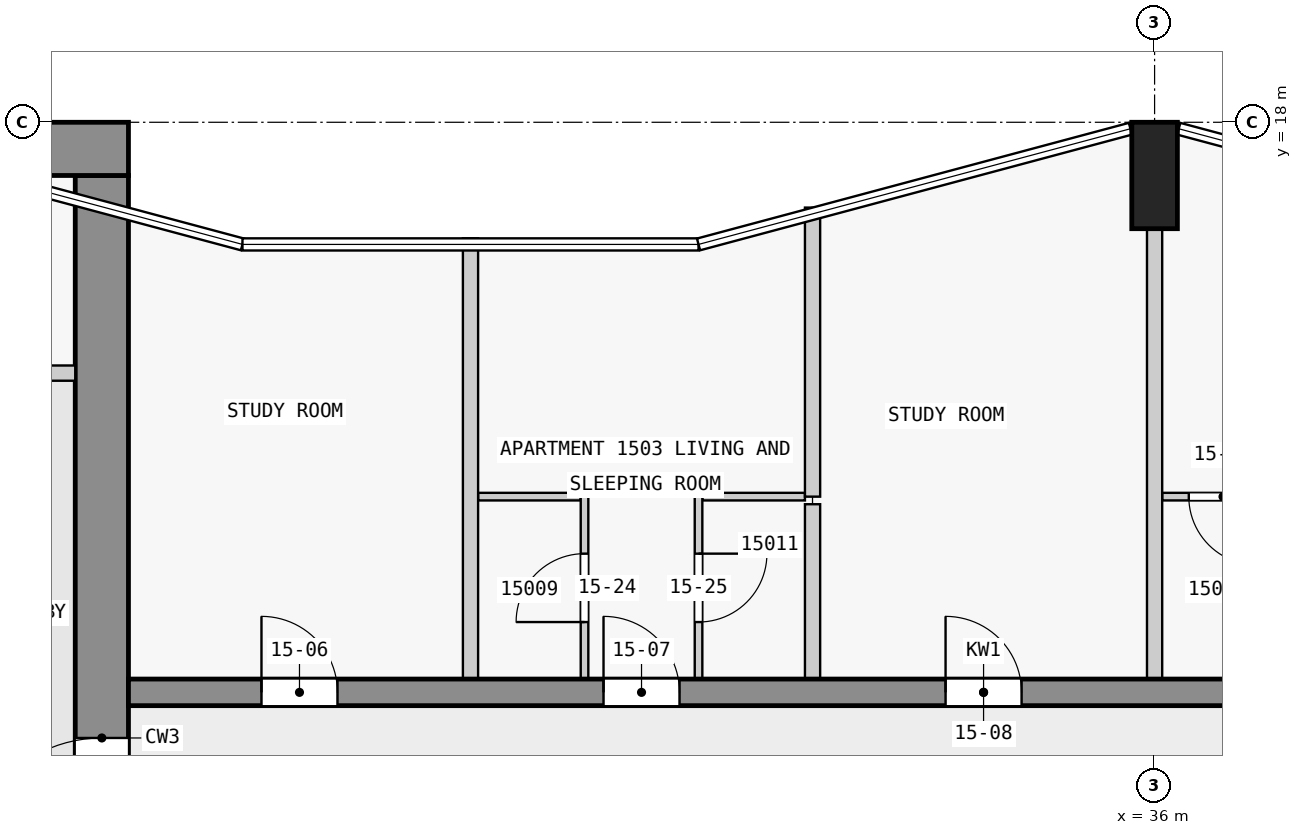
"""IFC4 building model, lengths in metres.
Left out: names, types, materials, properties, quantities, classifications, styles, units other than length and angle.
Written with IfcOpenShell. Run it as: python <this file> out.ifc"""

import sys

from ifc_helpers import new_model, si_unit, direction, frame, frame_2d, origin, origin_2d, place, context, subcontext, project, spatial, rectangle, extrude, element, fill, save


model = new_model("IFC4")
c1 = context("Model", 3, precision=1e-05, world=origin(), true_north=direction((0.0, 1.0)))
c2 = subcontext(c1, "Body", "Model", "MODEL_VIEW")
j1 = project(units=[si_unit("LENGTHUNIT", "METRE"), si_unit("PLANEANGLEUNIT", "RADIAN")], contexts=[c1])
p1 = place(None, origin())
s1 = spatial("IfcSite", under=j1, at=p1, CompositionType="ELEMENT")
p2 = place(p1, origin())
s2 = spatial("IfcBuilding", under=s1, at=p2, CompositionType="ELEMENT")
p3 = place(p2, frame((0.0, 0.0, 61.8)))
s3 = spatial("IfcBuildingStorey", under=s2, at=p3, CompositionType="ELEMENT", Elevation=61.8)
p4 = place(p3, frame((36.0, 17.3, 0.0), z_axis=(0.0, 0.0, 1.0), x_axis=(1.0, 0.0, 0.0)))
e1 = element("IfcColumn", 1, at=p4, inside=s3, PredefinedType="COLUMN", context=c2, shape_type="SweptSolid", body=[
    extrude(rectangle(XDim=0.6, YDim=1.4, at=origin_2d()), origin(), (0.0, 0.0, 1.0), 3.5),
])
p5 = place(p3, frame((1.6, 17.65, 0.0), z_axis=(0.0, 0.0, 1.0), x_axis=(1.0, 0.0, 0.0)))
e2 = element("IfcWall", 2, at=p5, inside=s3, PredefinedType="SHEAR", context=c2, shape_type="SweptSolid", body=[
    extrude(rectangle(XDim=20.9, YDim=0.7, at=frame_2d((10.45, 0.0))), origin(), (0.0, 0.0, 1.0), 3.25),
])
p6 = place(p5, frame((6.5, 0.0, 0.0)))
e3 = element("IfcOpeningElement", 3, at=p6, cuts=e2, PredefinedType="OPENING", context=c2, shape_type="SweptSolid", body=[
    extrude(rectangle(XDim=1.8, YDim=2.1, at=frame_2d((0.9, 1.05))), frame((0.0, 0.36, 0.0), z_axis=(0.0, -1.0, 0.0), x_axis=(1.0, 0.0, 0.0)), (0.0, 0.0, 1.0), 0.72),
])
p7 = place(p3, frame((22.15, 2.5, 0.0), z_axis=(0.0, 0.0, 1.0), x_axis=(0.0, 1.0, 0.0)))
e4 = element("IfcWall", 4, at=p7, inside=s3, PredefinedType="SHEAR", context=c2, shape_type="SweptSolid", body=[
    extrude(rectangle(XDim=14.8, YDim=0.7, at=frame_2d((7.4, 0.0))), origin(), (0.0, 0.0, 1.0), 3.25),
])
p8 = place(p7, frame((5.6, 0.0, 0.0)))
e5 = element("IfcOpeningElement", 5, at=p8, cuts=e4, PredefinedType="OPENING", context=c2, shape_type="SweptSolid", body=[
    extrude(rectangle(XDim=1.8, YDim=2.1, at=frame_2d((0.9, 1.05))), frame((0.0, 0.36, 0.0), z_axis=(0.0, -1.0, 0.0), x_axis=(1.0, 0.0, 0.0)), (0.0, 0.0, 1.0), 0.72),
])
p9 = place(p3, frame((22.5, 10.5, 0.0), z_axis=(0.0, 0.0, 1.0), x_axis=(1.0, 0.0, 0.0)))
e6 = element("IfcWall", 6, at=p9, inside=s3, PredefinedType="SHEAR", context=c2, shape_type="SweptSolid", body=[
    extrude(rectangle(XDim=22.5, YDim=0.35, at=frame_2d((11.25, 0.0))), origin(), (0.0, 0.0, 1.0), 3.25),
])
p10 = place(p9, frame((1.75, 0.0, 0.0)))
e7 = element("IfcOpeningElement", 7, at=p10, cuts=e6, PredefinedType="OPENING", context=c2, shape_type="SweptSolid", body=[
    extrude(rectangle(XDim=1.0, YDim=2.1, at=frame_2d((0.5, 1.05))), frame((0.0, 0.185, 0.0), z_axis=(0.0, -1.0, 0.0), x_axis=(1.0, 0.0, 0.0)), (0.0, 0.0, 1.0), 0.37),
])
p11 = place(p9, frame((6.25, 0.0, 0.0)))
e8 = element("IfcOpeningElement", 8, at=p11, cuts=e6, PredefinedType="OPENING", context=c2, shape_type="SweptSolid", body=[
    extrude(rectangle(XDim=1.0, YDim=2.1, at=frame_2d((0.5, 1.05))), frame((0.0, 0.185, 0.0), z_axis=(0.0, -1.0, 0.0), x_axis=(1.0, 0.0, 0.0)), (0.0, 0.0, 1.0), 0.37),
])
p12 = place(p9, frame((10.75, 0.0, 0.0)))
e9 = element("IfcOpeningElement", 9, at=p12, cuts=e6, PredefinedType="OPENING", context=c2, shape_type="SweptSolid", body=[
    extrude(rectangle(XDim=1.0, YDim=2.1, at=frame_2d((0.5, 1.05))), frame((0.0, 0.185, 0.0), z_axis=(0.0, -1.0, 0.0), x_axis=(1.0, 0.0, 0.0)), (0.0, 0.0, 1.0), 0.37),
])
p13 = place(p9, frame((16.85, 0.0, 0.0)))
e10 = element("IfcOpeningElement", 10, at=p13, cuts=e6, PredefinedType="OPENING", context=c2, shape_type="SweptSolid", body=[
    extrude(rectangle(XDim=1.0, YDim=2.1, at=frame_2d((0.5, 1.05))), frame((0.0, 0.185, 0.0), z_axis=(0.0, -1.0, 0.0), x_axis=(1.0, 0.0, 0.0)), (0.0, 0.0, 1.0), 0.37),
])
p14 = place(p3, frame((18.6, 14.7, 0.0), z_axis=(0.0, 0.0, 1.0), x_axis=(1.0, 0.0, 0.0)))
e11 = element("IfcWall", 11, at=p14, inside=s3, PredefinedType="PARTITIONING", context=c2, shape_type="SweptSolid", body=[
    extrude(rectangle(XDim=3.2, YDim=0.2, at=frame_2d((1.6, 0.0))), origin(), (0.0, 0.0, 1.0), 3.25),
])
p15 = place(p14, frame((0.15, 0.0, 0.0)))
e12 = element("IfcOpeningElement", 12, at=p15, cuts=e11, PredefinedType="OPENING", context=c2, shape_type="SweptSolid", body=[
    extrude(rectangle(XDim=0.9, YDim=2.1, at=frame_2d((0.45, 1.05))), frame((0.0, 0.11, 0.0), z_axis=(0.0, -1.0, 0.0), x_axis=(1.0, 0.0, 0.0)), (0.0, 0.0, 1.0), 0.22),
])
p16 = place(p14, frame((1.75, 0.0, 0.0)))
e13 = element("IfcOpeningElement", 13, at=p16, cuts=e11, PredefinedType="OPENING", context=c2, shape_type="SweptSolid", body=[
    extrude(rectangle(XDim=0.9, YDim=2.1, at=frame_2d((0.45, 1.05))), frame((0.0, 0.11, 0.0), z_axis=(0.0, -1.0, 0.0), x_axis=(1.0, 0.0, 0.0)), (0.0, 0.0, 1.0), 0.22),
])
for number, where, z_axis, x_axis in (
    (14, (28.45, 13.075, 0.0), (0.0, 0.0, 1.0), (-1.0, 0.0, 0.0)),
    (15, (31.4, 13.075, 0.0), (0.0, 0.0, 1.0), (-1.0, 0.0, 0.0)),
):
    element("IfcWall", number, at=place(p3, frame(where, z_axis=z_axis, x_axis=x_axis)), inside=s3, PredefinedType="PARTITIONING", context=c2, shape_type="SweptSolid", body=[
        extrude(rectangle(XDim=1.35, YDim=0.1, at=frame_2d((0.675, 0.0))), origin(), (0.0, 0.0, 1.0), 3.25),
    ])
p17 = place(p3, frame((39.1, 13.075, 0.0), z_axis=(0.0, 0.0, 1.0), x_axis=(-1.0, 0.0, 0.0)))
e16 = element("IfcWall", 16, at=p17, inside=s3, PredefinedType="PARTITIONING", context=c2, shape_type="SweptSolid", body=[
    extrude(rectangle(XDim=3.0, YDim=0.1, at=frame_2d((1.5, 0.0))), origin(), (0.0, 0.0, 1.0), 3.25),
])
p18 = place(p17, frame((1.75, 0.0, 0.0)))
e17 = element("IfcOpeningElement", 17, at=p18, cuts=e16, PredefinedType="OPENING", context=c2, shape_type="SweptSolid", body=[
    extrude(rectangle(XDim=0.9, YDim=2.1, at=frame_2d((0.45, 1.05))), frame((0.0, 0.06, 0.0), z_axis=(0.0, -1.0, 0.0), x_axis=(1.0, 0.0, 0.0)), (0.0, 0.0, 1.0), 0.12),
])
p19 = place(p3, frame((27.0, 10.675, 0.0), z_axis=(0.0, 0.0, 1.0), x_axis=(0.0, 1.0, 0.0)))
e18 = element("IfcWall", 18, at=p19, inside=s3, PredefinedType="PARTITIONING", context=c2, shape_type="SweptSolid", body=[
    extrude(rectangle(XDim=5.798, YDim=0.2, at=frame_2d((2.899, 0.0))), origin(), (0.0, 0.0, 1.0), 3.25),
])
p20 = place(p3, frame((28.5, 10.675, 0.0), z_axis=(0.0, 0.0, 1.0), x_axis=(0.0, 1.0, 0.0)))
e19 = element("IfcWall", 19, at=p20, inside=s3, PredefinedType="PARTITIONING", context=c2, shape_type="SweptSolid", body=[
    extrude(rectangle(XDim=2.4, YDim=0.1, at=frame_2d((1.2, 0.0))), origin(), (0.0, 0.0, 1.0), 3.25),
])
p21 = place(p20, frame((0.75, 0.0, 0.0)))
e20 = element("IfcOpeningElement", 20, at=p21, cuts=e19, PredefinedType="OPENING", context=c2, shape_type="SweptSolid", body=[
    extrude(rectangle(XDim=0.9, YDim=2.1, at=frame_2d((0.45, 1.05))), frame((0.0, 0.06, 0.0), z_axis=(0.0, -1.0, 0.0), x_axis=(1.0, 0.0, 0.0)), (0.0, 0.0, 1.0), 0.12),
])
p22 = place(p3, frame((30.0, 13.075, 0.0), z_axis=(0.0, 0.0, 1.0), x_axis=(0.0, -1.0, 0.0)))
e21 = element("IfcWall", 21, at=p22, inside=s3, PredefinedType="PARTITIONING", context=c2, shape_type="SweptSolid", body=[
    extrude(rectangle(XDim=2.4, YDim=0.1, at=frame_2d((1.2, 0.0))), origin(), (0.0, 0.0, 1.0), 3.25),
])
p23 = place(p22, frame((0.75, 0.0, 0.0)))
e22 = element("IfcOpeningElement", 22, at=p23, cuts=e21, PredefinedType="OPENING", context=c2, shape_type="SweptSolid", body=[
    extrude(rectangle(XDim=0.9, YDim=2.1, at=frame_2d((0.45, 1.05))), frame((0.0, 0.06, 0.0), z_axis=(0.0, -1.0, 0.0), x_axis=(1.0, 0.0, 0.0)), (0.0, 0.0, 1.0), 0.12),
])
p24 = place(p3, frame((31.5, 16.878, 0.0), z_axis=(0.0, 0.0, 1.0), x_axis=(0.0, -1.0, 0.0)))
e23 = element("IfcWall", 23, at=p24, inside=s3, PredefinedType="PARTITIONING", context=c2, shape_type="SweptSolid", body=[
    extrude(rectangle(XDim=3.803, YDim=0.2, at=frame_2d((1.901, 0.0))), origin(), (0.0, 0.0, 1.0), 3.25),
])
p25 = place(p3, frame((31.5, 10.675, 0.0), z_axis=(0.0, 0.0, 1.0), x_axis=(0.0, 1.0, 0.0)))
e24 = element("IfcWall", 24, at=p25, inside=s3, PredefinedType="PARTITIONING", context=c2, shape_type="SweptSolid", body=[
    extrude(rectangle(XDim=2.3, YDim=0.2, at=frame_2d((1.15, 0.0))), origin(), (0.0, 0.0, 1.0), 3.25),
])
p26 = place(p3, frame((36.0, 10.675, 0.0), z_axis=(0.0, 0.0, 1.0), x_axis=(0.0, 1.0, 0.0)))
e25 = element("IfcWall", 25, at=p26, inside=s3, PredefinedType="PARTITIONING", context=c2, shape_type="SweptSolid", body=[
    extrude(rectangle(XDim=5.925, YDim=0.2, at=frame_2d((2.962, 0.0))), origin(), (0.0, 0.0, 1.0), 3.25),
])
p27 = place(p8, origin())
e26 = element("IfcDoor", 26, at=p27, inside=s3, OperationType="DOUBLE_DOOR_SINGLE_SWING", PredefinedType="DOOR", context=c2, shape_type="SweptSolid", body=[
    extrude(rectangle(XDim=1.8, YDim=2.1, at=frame_2d((0.9, 1.05))), frame((0.0, 0.025, 0.0), z_axis=(0.0, -1.0, 0.0), x_axis=(1.0, 0.0, 0.0)), (0.0, 0.0, 1.0), 0.05),
])
fill(e5, e26)
p28 = place(p10, origin())
e27 = element("IfcDoor", 27, at=p28, inside=s3, OperationType="SINGLE_SWING_LEFT", PredefinedType="DOOR", context=c2, shape_type="SweptSolid", body=[
    extrude(rectangle(XDim=1.0, YDim=2.1, at=frame_2d((0.5, 1.05))), frame((0.0, 0.025, 0.0), z_axis=(0.0, -1.0, 0.0), x_axis=(1.0, 0.0, 0.0)), (0.0, 0.0, 1.0), 0.05),
])
fill(e7, e27)
p29 = place(p11, origin())
e28 = element("IfcDoor", 28, at=p29, inside=s3, OperationType="SINGLE_SWING_LEFT", PredefinedType="DOOR", context=c2, shape_type="SweptSolid", body=[
    extrude(rectangle(XDim=1.0, YDim=2.1, at=frame_2d((0.5, 1.05))), frame((0.0, 0.025, 0.0), z_axis=(0.0, -1.0, 0.0), x_axis=(1.0, 0.0, 0.0)), (0.0, 0.0, 1.0), 0.05),
])
fill(e8, e28)
p30 = place(p12, origin())
e29 = element("IfcDoor", 29, at=p30, inside=s3, OperationType="SINGLE_SWING_LEFT", PredefinedType="DOOR", context=c2, shape_type="SweptSolid", body=[
    extrude(rectangle(XDim=1.0, YDim=2.1, at=frame_2d((0.5, 1.05))), frame((0.0, 0.025, 0.0), z_axis=(0.0, -1.0, 0.0), x_axis=(1.0, 0.0, 0.0)), (0.0, 0.0, 1.0), 0.05),
])
fill(e9, e29)
p31 = place(p21, origin())
e30 = element("IfcDoor", 30, at=p31, inside=s3, OperationType="SINGLE_SWING_RIGHT", PredefinedType="DOOR", context=c2, shape_type="SweptSolid", body=[
    extrude(rectangle(XDim=0.9, YDim=2.1, at=frame_2d((0.45, 1.05))), frame((0.0, 0.025, 0.0), z_axis=(0.0, -1.0, 0.0), x_axis=(1.0, 0.0, 0.0)), (0.0, 0.0, 1.0), 0.05),
])
fill(e20, e30)
p32 = place(p23, origin())
e31 = element("IfcDoor", 31, at=p32, inside=s3, OperationType="SINGLE_SWING_RIGHT", PredefinedType="DOOR", context=c2, shape_type="SweptSolid", body=[
    extrude(rectangle(XDim=0.9, YDim=2.1, at=frame_2d((0.45, 1.05))), frame((0.0, 0.025, 0.0), z_axis=(0.0, -1.0, 0.0), x_axis=(1.0, 0.0, 0.0)), (0.0, 0.0, 1.0), 0.05),
])
fill(e22, e31)
p33 = place(p18, origin())
e32 = element("IfcDoor", 32, at=p33, inside=s3, OperationType="SINGLE_SWING_RIGHT", PredefinedType="DOOR", context=c2, shape_type="SweptSolid", body=[
    extrude(rectangle(XDim=0.9, YDim=2.1, at=frame_2d((0.45, 1.05))), frame((0.0, 0.025, 0.0), z_axis=(0.0, -1.0, 0.0), x_axis=(1.0, 0.0, 0.0)), (0.0, 0.0, 1.0), 0.05),
])
fill(e17, e32)
save(model, sys.argv[1])
